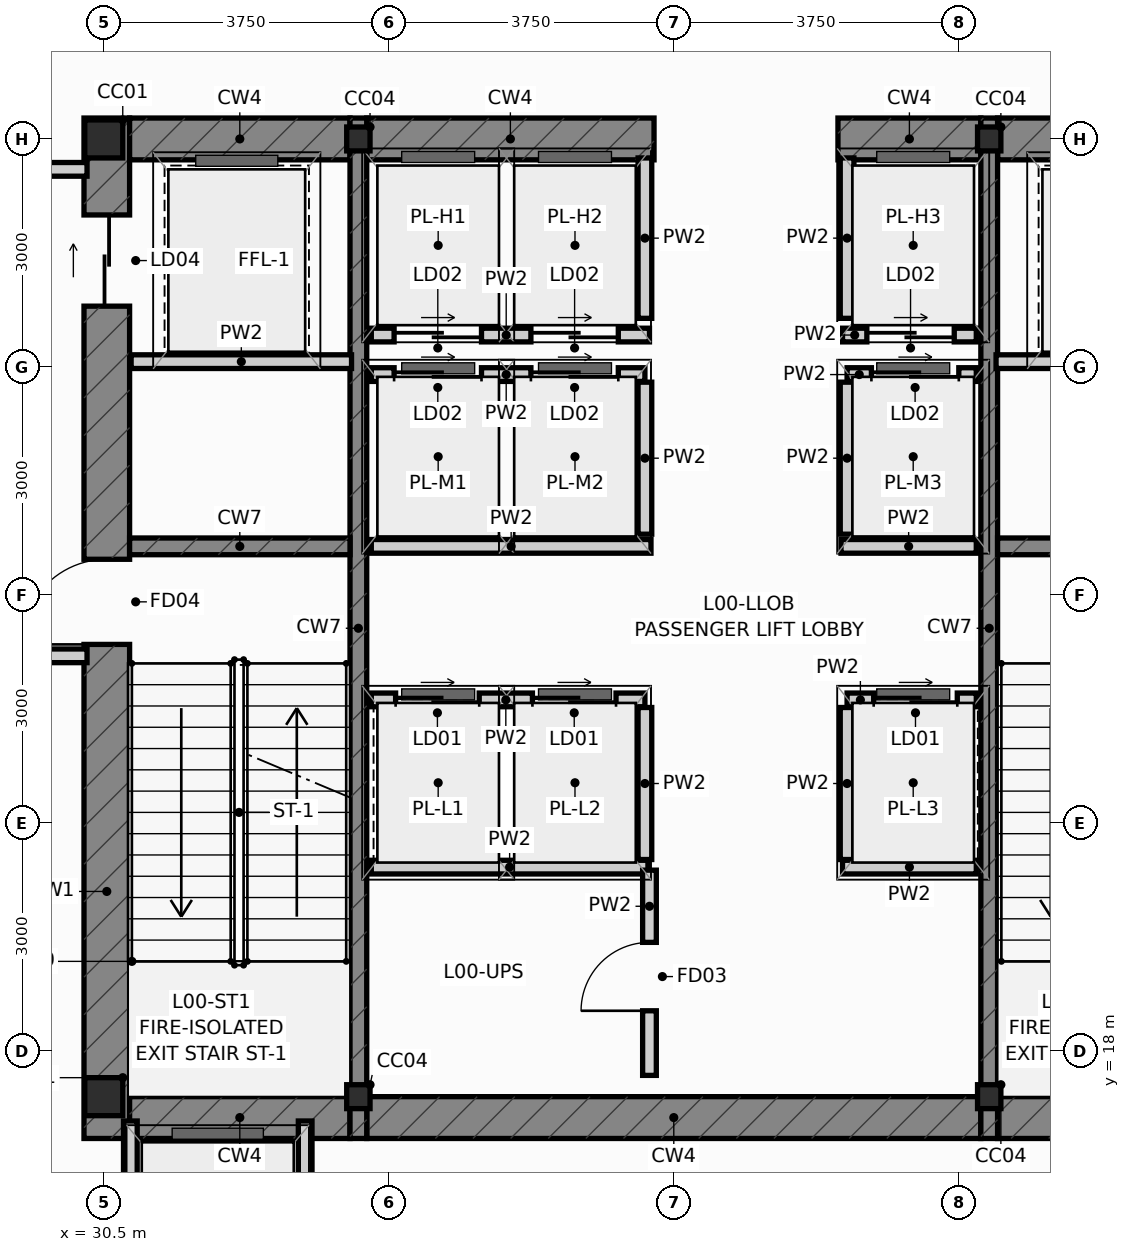
"""IFC4 building model, lengths in metres.
Left out: names, types, materials, properties, quantities, classifications, styles, units other than length and angle.
Written with IfcOpenShell. Run it as: python <this file> out.ifc"""

import sys

from ifc_helpers import new_model, si_unit, direction, frame, frame_2d, origin, origin_2d, place, context, subcontext, project, spatial, rectangle, i_section, extrude, source, transform, mapped, element, fill, save


model = new_model("IFC4")
c1 = context("Model", 3, precision=1e-05, world=origin(), true_north=direction((0.0, 1.0)))
c2 = subcontext(c1, "Body", "Model", "MODEL_VIEW")
j1 = project(units=[si_unit("LENGTHUNIT", "METRE"), si_unit("PLANEANGLEUNIT", "RADIAN")], contexts=[c1])
p1 = place(None, origin())
s1 = spatial("IfcSite", under=j1, at=p1, CompositionType="ELEMENT")
p2 = place(p1, origin())
s2 = spatial("IfcBuilding", under=s1, at=p2, CompositionType="ELEMENT")
p3 = place(p2, origin())
s3 = spatial("IfcBuildingStorey", under=s2, at=p3, CompositionType="ELEMENT", Elevation=0.0)
m1 = source(origin(), c2, "Body", "SweptSolid", [
    extrude(i_section(OverallWidth=0.5, OverallDepth=0.5, WebThickness=0.028, FlangeThickness=0.04, at=origin_2d()), origin(), (0.0, 0.0, 1.0), 5.4),
])
for number, where, z_axis, x_axis in (
    (1, (30.5, 17.4, 0.0), (0.0, 0.0, 1.0), (1.0, 0.0, 0.0)),
    (2, (30.5, 30.0, 0.0), (0.0, 0.0, 1.0), (1.0, 0.0, 0.0)),
):
    element("IfcColumn", number, at=place(p3, frame(where, z_axis=z_axis, x_axis=x_axis)), inside=s3, PredefinedType="COLUMN", context=c2, shape_type="MappedRepresentation", body=[
        mapped(m1, transform((0.0, 0.0, 0.0), scale=1.0)),
    ])
m2 = source(origin(), c2, "Body", "SweptSolid", [
    extrude(i_section(OverallWidth=0.307, OverallDepth=0.315, WebThickness=0.012, FlangeThickness=0.019, at=origin_2d()), origin(), (0.0, 0.0, 1.0), 5.4),
])
for number, where, z_axis, x_axis in (
    (3, (33.85, 17.4, 0.0), (0.0, 0.0, 1.0), (1.0, 0.0, 0.0)),
    (4, (42.15, 17.4, 0.0), (0.0, 0.0, 1.0), (1.0, 0.0, 0.0)),
    (5, (33.85, 30.0, 0.0), (0.0, 0.0, 1.0), (1.0, 0.0, 0.0)),
    (6, (42.15, 30.0, 0.0), (0.0, 0.0, 1.0), (1.0, 0.0, 0.0)),
):
    element("IfcColumn", number, at=place(p3, frame(where, z_axis=z_axis, x_axis=x_axis)), inside=s3, PredefinedType="COLUMN", context=c2, shape_type="MappedRepresentation", body=[
        mapped(m2, transform((0.0, 0.0, 0.0), scale=1.0)),
    ])
p4 = place(p3, frame((30.54, 16.85, 0.0), z_axis=(0.0, 0.0, 1.0), x_axis=(0.0, 1.0, 0.0)))
e7 = element("IfcWall", 7, at=p4, inside=s3, PredefinedType="SHEAR", context=c2, shape_type="SweptSolid", body=[
    extrude(rectangle(XDim=13.425, YDim=0.6, at=frame_2d((6.712, 0.0))), origin(), (0.0, 0.0, 1.0), 5.4),
])
p5 = place(p4, frame((6.5, 0.0, 0.0)))
e8 = element("IfcOpeningElement", 8, at=p5, cuts=e7, PredefinedType="OPENING", context=c2, shape_type="SweptSolid", body=[
    extrude(rectangle(XDim=1.12, YDim=2.15, at=frame_2d((0.56, 1.075))), frame((0.0, 0.312, 0.0), z_axis=(0.0, -1.0, 0.0), x_axis=(1.0, 0.0, 0.0)), (0.0, 0.0, 1.0), 0.624),
])
p6 = place(p4, frame((10.95, 0.0, 0.0)))
e9 = element("IfcOpeningElement", 9, at=p6, cuts=e7, PredefinedType="OPENING", context=c2, shape_type="SweptSolid", body=[
    extrude(rectangle(XDim=1.2, YDim=2.2, at=frame_2d((0.6, 1.1))), frame((0.0, 0.312, 0.0), z_axis=(0.0, -1.0, 0.0), x_axis=(1.0, 0.0, 0.0)), (0.0, 0.0, 1.0), 0.624),
])
p7 = place(p3, frame((30.84, 17.125, 0.0), z_axis=(0.0, 0.0, 1.0), x_axis=(1.0, 0.0, 0.0)))
e10 = element("IfcWall", 10, at=p7, inside=s3, PredefinedType="SHEAR", context=c2, shape_type="SweptSolid", body=[
    extrude(rectangle(XDim=2.9, YDim=0.55, at=frame_2d((1.45, 0.0))), origin(), (0.0, 0.0, 1.0), 5.4),
])
p8 = place(p3, frame((33.96, 17.125, 0.0), z_axis=(0.0, 0.0, 1.0), x_axis=(1.0, 0.0, 0.0)))
e11 = element("IfcWall", 11, at=p8, inside=s3, PredefinedType="SHEAR", context=c2, shape_type="SweptSolid", body=[
    extrude(rectangle(XDim=8.08, YDim=0.55, at=frame_2d((4.04, 0.0))), origin(), (0.0, 0.0, 1.0), 5.4),
])
for number, where, z_axis, x_axis in (
    (12, (42.26, 17.125, 0.0), (0.0, 0.0, 1.0), (1.0, 0.0, 0.0)),
    (13, (30.84, 30.0, 0.0), (0.0, 0.0, 1.0), (1.0, 0.0, 0.0)),
):
    element("IfcWall", number, at=place(p3, frame(where, z_axis=z_axis, x_axis=x_axis)), inside=s3, PredefinedType="SHEAR", context=c2, shape_type="SweptSolid", body=[
        extrude(rectangle(XDim=2.9, YDim=0.55, at=frame_2d((1.45, 0.0))), origin(), (0.0, 0.0, 1.0), 5.4),
    ])
p9 = place(p3, frame((33.96, 30.0, 0.0), z_axis=(0.0, 0.0, 1.0), x_axis=(1.0, 0.0, 0.0)))
e14 = element("IfcWall", 14, at=p9, inside=s3, PredefinedType="SHEAR", context=c2, shape_type="SweptSolid", body=[
    extrude(rectangle(XDim=3.78, YDim=0.55, at=frame_2d((1.89, 0.0))), origin(), (0.0, 0.0, 1.0), 5.4),
])
p10 = place(p3, frame((40.16, 30.0, 0.0), z_axis=(0.0, 0.0, 1.0), x_axis=(1.0, 0.0, 0.0)))
e15 = element("IfcWall", 15, at=p10, inside=s3, PredefinedType="SHEAR", context=c2, shape_type="SweptSolid", body=[
    extrude(rectangle(XDim=1.88, YDim=0.55, at=frame_2d((0.94, 0.0))), origin(), (0.0, 0.0, 1.0), 5.4),
])
p11 = place(p3, frame((42.26, 30.0, 0.0), z_axis=(0.0, 0.0, 1.0), x_axis=(1.0, 0.0, 0.0)))
e16 = element("IfcWall", 16, at=p11, inside=s3, PredefinedType="SHEAR", context=c2, shape_type="SweptSolid", body=[
    extrude(rectangle(XDim=2.9, YDim=0.55, at=frame_2d((1.45, 0.0))), origin(), (0.0, 0.0, 1.0), 5.4),
])
for number, where, z_axis, x_axis in (
    (17, (33.85, 16.85, 0.0), (0.0, 0.0, 1.0), (0.0, 1.0, 0.0)),
    (18, (42.15, 16.85, 0.0), (0.0, 0.0, 1.0), (0.0, 1.0, 0.0)),
):
    element("IfcWall", number, at=place(p3, frame(where, z_axis=z_axis, x_axis=x_axis)), inside=s3, PredefinedType="SHEAR", context=c2, shape_type="SweptSolid", body=[
        extrude(rectangle(XDim=13.425, YDim=0.22, at=frame_2d((6.712, 0.0))), origin(), (0.0, 0.0, 1.0), 5.4),
    ])
for number, where, z_axis, x_axis in (
    (19, (30.84, 24.64, 0.0), (0.0, 0.0, 1.0), (1.0, 0.0, 0.0)),
    (20, (42.26, 24.64, 0.0), (0.0, 0.0, 1.0), (1.0, 0.0, 0.0)),
):
    element("IfcWall", number, at=place(p3, frame(where, z_axis=z_axis, x_axis=x_axis)), inside=s3, PredefinedType="SHEAR", context=c2, shape_type="SweptSolid", body=[
        extrude(rectangle(XDim=2.9, YDim=0.22, at=frame_2d((1.45, 0.0))), origin(), (0.0, 0.0, 1.0), 5.4),
    ])
p12 = place(p3, frame((30.85, 14.42, 0.0), z_axis=(0.0, 0.0, 1.0), x_axis=(0.0, 1.0, 0.0)))
e21 = element("IfcWall", 21, at=p12, inside=s3, PredefinedType="PARTITIONING", context=c2, shape_type="SweptSolid", body=[
    extrude(rectangle(XDim=2.66, YDim=0.18, at=frame_2d((1.33, 0.0))), origin(), (0.0, 0.0, 1.0), 4.453),
])
p13 = place(p3, frame((33.15, 14.42, 0.0), z_axis=(0.0, 0.0, 1.0), x_axis=(0.0, 1.0, 0.0)))
e22 = element("IfcWall", 22, at=p13, inside=s3, PredefinedType="PARTITIONING", context=c2, shape_type="SweptSolid", body=[
    extrude(rectangle(XDim=2.66, YDim=0.18, at=frame_2d((1.33, 0.0))), origin(), (0.0, 0.0, 1.0), 5.08),
])
p14 = place(p3, frame((34.02, 22.62, 0.0), z_axis=(0.0, 0.0, 1.0), x_axis=(1.0, 0.0, 0.0)))
e23 = element("IfcWall", 23, at=p14, inside=s3, PredefinedType="PARTITIONING", context=c2, shape_type="SweptSolid", body=[
    extrude(rectangle(XDim=3.6, YDim=0.18, at=frame_2d((1.8, 0.0))), origin(), (0.0, 0.0, 1.0), 5.08),
])
p15 = place(p14, frame((0.32, 0.0, 0.0)))
e24 = element("IfcOpeningElement", 24, at=p15, cuts=e23, PredefinedType="OPENING", context=c2, shape_type="SweptSolid", body=[
    extrude(rectangle(XDim=1.1, YDim=2.2, at=frame_2d((0.55, 1.1))), frame((0.0, 0.102, 0.0), z_axis=(0.0, -1.0, 0.0), x_axis=(1.0, 0.0, 0.0)), (0.0, 0.0, 1.0), 0.204),
])
p16 = place(p14, frame((2.12, 0.0, 0.0)))
e25 = element("IfcOpeningElement", 25, at=p16, cuts=e23, PredefinedType="OPENING", context=c2, shape_type="SweptSolid", body=[
    extrude(rectangle(XDim=1.1, YDim=2.2, at=frame_2d((0.55, 1.1))), frame((0.0, 0.102, 0.0), z_axis=(0.0, -1.0, 0.0), x_axis=(1.0, 0.0, 0.0)), (0.0, 0.0, 1.0), 0.204),
])
p17 = place(p3, frame((40.28, 22.62, 0.0), z_axis=(0.0, 0.0, 1.0), x_axis=(1.0, 0.0, 0.0)))
e26 = element("IfcWall", 26, at=p17, inside=s3, PredefinedType="PARTITIONING", context=c2, shape_type="SweptSolid", body=[
    extrude(rectangle(XDim=1.7, YDim=0.18, at=frame_2d((0.85, 0.0))), origin(), (0.0, 0.0, 1.0), 5.08),
])
p18 = place(p17, frame((0.35, 0.0, 0.0)))
e27 = element("IfcOpeningElement", 27, at=p18, cuts=e26, PredefinedType="OPENING", context=c2, shape_type="SweptSolid", body=[
    extrude(rectangle(XDim=1.1, YDim=2.2, at=frame_2d((0.55, 1.1))), frame((0.0, 0.102, 0.0), z_axis=(0.0, -1.0, 0.0), x_axis=(1.0, 0.0, 0.0)), (0.0, 0.0, 1.0), 0.204),
])
for number, where, z_axis, x_axis in (
    (28, (37.62, 20.52, 0.0), (0.0, 0.0, 1.0), (0.0, 1.0, 0.0)),
    (29, (40.28, 20.52, 0.0), (0.0, 0.0, 1.0), (0.0, 1.0, 0.0)),
):
    element("IfcWall", number, at=place(p3, frame(where, z_axis=z_axis, x_axis=x_axis)), inside=s3, PredefinedType="PARTITIONING", context=c2, shape_type="SweptSolid", body=[
        extrude(rectangle(XDim=2.0, YDim=0.18, at=frame_2d((1.0, 0.0))), origin(), (0.0, 0.0, 1.0), 5.08),
    ])
p19 = place(p3, frame((34.02, 26.9, 0.0), z_axis=(0.0, 0.0, 1.0), x_axis=(1.0, 0.0, 0.0)))
e30 = element("IfcWall", 30, at=p19, inside=s3, PredefinedType="PARTITIONING", context=c2, shape_type="SweptSolid", body=[
    extrude(rectangle(XDim=3.6, YDim=0.18, at=frame_2d((1.8, 0.0))), origin(), (0.0, 0.0, 1.0), 5.08),
])
p20 = place(p19, frame((0.3, 0.0, 0.0)))
e31 = element("IfcOpeningElement", 31, at=p20, cuts=e30, PredefinedType="OPENING", context=c2, shape_type="SweptSolid", body=[
    extrude(rectangle(XDim=1.15, YDim=2.2, at=frame_2d((0.575, 1.1))), frame((0.0, 0.102, 0.0), z_axis=(0.0, -1.0, 0.0), x_axis=(1.0, 0.0, 0.0)), (0.0, 0.0, 1.0), 0.204),
])
p21 = place(p19, frame((2.1, 0.0, 0.0)))
e32 = element("IfcOpeningElement", 32, at=p21, cuts=e30, PredefinedType="OPENING", context=c2, shape_type="SweptSolid", body=[
    extrude(rectangle(XDim=1.15, YDim=2.2, at=frame_2d((0.575, 1.1))), frame((0.0, 0.102, 0.0), z_axis=(0.0, -1.0, 0.0), x_axis=(1.0, 0.0, 0.0)), (0.0, 0.0, 1.0), 0.204),
])
p22 = place(p3, frame((40.28, 26.9, 0.0), z_axis=(0.0, 0.0, 1.0), x_axis=(1.0, 0.0, 0.0)))
e33 = element("IfcWall", 33, at=p22, inside=s3, PredefinedType="PARTITIONING", context=c2, shape_type="SweptSolid", body=[
    extrude(rectangle(XDim=1.7, YDim=0.18, at=frame_2d((0.85, 0.0))), origin(), (0.0, 0.0, 1.0), 5.08),
])
p23 = place(p22, frame((0.32, 0.0, 0.0)))
e34 = element("IfcOpeningElement", 34, at=p23, cuts=e33, PredefinedType="OPENING", context=c2, shape_type="SweptSolid", body=[
    extrude(rectangle(XDim=1.15, YDim=2.2, at=frame_2d((0.575, 1.1))), frame((0.0, 0.102, 0.0), z_axis=(0.0, -1.0, 0.0), x_axis=(1.0, 0.0, 0.0)), (0.0, 0.0, 1.0), 0.204),
])
for number, where, z_axis, x_axis in (
    (35, (37.62, 24.8, 0.0), (0.0, 0.0, 1.0), (0.0, 1.0, 0.0)),
    (36, (40.28, 24.8, 0.0), (0.0, 0.0, 1.0), (0.0, 1.0, 0.0)),
):
    element("IfcWall", number, at=place(p3, frame(where, z_axis=z_axis, x_axis=x_axis)), inside=s3, PredefinedType="PARTITIONING", context=c2, shape_type="SweptSolid", body=[
        extrude(rectangle(XDim=2.0, YDim=0.18, at=frame_2d((1.0, 0.0))), origin(), (0.0, 0.0, 1.0), 5.08),
    ])
p24 = place(p3, frame((34.02, 24.64, 0.0), z_axis=(0.0, 0.0, 1.0), x_axis=(1.0, 0.0, 0.0)))
e37 = element("IfcWall", 37, at=p24, inside=s3, PredefinedType="PARTITIONING", context=c2, shape_type="SweptSolid", body=[
    extrude(rectangle(XDim=3.68, YDim=0.18, at=frame_2d((1.84, 0.0))), origin(), (0.0, 0.0, 1.0), 5.08),
])
p25 = place(p3, frame((40.2, 24.64, 0.0), z_axis=(0.0, 0.0, 1.0), x_axis=(1.0, 0.0, 0.0)))
e38 = element("IfcWall", 38, at=p25, inside=s3, PredefinedType="PARTITIONING", context=c2, shape_type="SweptSolid", body=[
    extrude(rectangle(XDim=1.78, YDim=0.18, at=frame_2d((0.89, 0.0))), origin(), (0.0, 0.0, 1.0), 5.08),
])
p26 = place(p3, frame((34.02, 27.42, 0.0), z_axis=(0.0, 0.0, 1.0), x_axis=(1.0, 0.0, 0.0)))
e39 = element("IfcWall", 39, at=p26, inside=s3, PredefinedType="PARTITIONING", context=c2, shape_type="SweptSolid", body=[
    extrude(rectangle(XDim=3.66, YDim=0.18, at=frame_2d((1.83, 0.0))), origin(), (0.0, 0.0, 1.0), 5.08),
])
p27 = place(p26, frame((0.3, 0.0, 0.0)))
e40 = element("IfcOpeningElement", 40, at=p27, cuts=e39, PredefinedType="OPENING", context=c2, shape_type="SweptSolid", body=[
    extrude(rectangle(XDim=1.15, YDim=2.2, at=frame_2d((0.575, 1.1))), frame((0.0, 0.102, 0.0), z_axis=(0.0, -1.0, 0.0), x_axis=(1.0, 0.0, 0.0)), (0.0, 0.0, 1.0), 0.204),
])
p28 = place(p26, frame((2.1, 0.0, 0.0)))
e41 = element("IfcOpeningElement", 41, at=p28, cuts=e39, PredefinedType="OPENING", context=c2, shape_type="SweptSolid", body=[
    extrude(rectangle(XDim=1.15, YDim=2.2, at=frame_2d((0.575, 1.1))), frame((0.0, 0.102, 0.0), z_axis=(0.0, -1.0, 0.0), x_axis=(1.0, 0.0, 0.0)), (0.0, 0.0, 1.0), 0.204),
])
p29 = place(p3, frame((40.22, 27.42, 0.0), z_axis=(0.0, 0.0, 1.0), x_axis=(1.0, 0.0, 0.0)))
e42 = element("IfcWall", 42, at=p29, inside=s3, PredefinedType="PARTITIONING", context=c2, shape_type="SweptSolid", body=[
    extrude(rectangle(XDim=1.76, YDim=0.18, at=frame_2d((0.88, 0.0))), origin(), (0.0, 0.0, 1.0), 5.08),
])
p30 = place(p29, frame((0.32, 0.0, 0.0)))
e43 = element("IfcOpeningElement", 43, at=p30, cuts=e42, PredefinedType="OPENING", context=c2, shape_type="SweptSolid", body=[
    extrude(rectangle(XDim=1.15, YDim=2.2, at=frame_2d((0.575, 1.1))), frame((0.0, 0.102, 0.0), z_axis=(0.0, -1.0, 0.0), x_axis=(1.0, 0.0, 0.0)), (0.0, 0.0, 1.0), 0.204),
])
for number, where, z_axis, x_axis in (
    (44, (37.62, 27.64, 0.0), (0.0, 0.0, 1.0), (0.0, 1.0, 0.0)),
    (45, (40.28, 27.64, 0.0), (0.0, 0.0, 1.0), (0.0, 1.0, 0.0)),
):
    element("IfcWall", number, at=place(p3, frame(where, z_axis=z_axis, x_axis=x_axis)), inside=s3, PredefinedType="PARTITIONING", context=c2, shape_type="SweptSolid", body=[
        extrude(rectangle(XDim=2.11, YDim=0.18, at=frame_2d((1.055, 0.0))), origin(), (0.0, 0.0, 1.0), 5.08),
    ])
p31 = place(p3, frame((27.52, 23.2, 0.0), z_axis=(0.0, 0.0, 1.0), x_axis=(1.0, 0.0, 0.0)))
e46 = element("IfcWall", 46, at=p31, inside=s3, PredefinedType="PARTITIONING", context=c2, shape_type="SweptSolid", body=[
    extrude(rectangle(XDim=2.76, YDim=0.18, at=frame_2d((1.38, 0.0))), origin(), (0.0, 0.0, 1.0), 5.08),
])
p32 = place(p3, frame((27.52, 29.6, 0.0), z_axis=(0.0, 0.0, 1.0), x_axis=(1.0, 0.0, 0.0)))
e47 = element("IfcWall", 47, at=p32, inside=s3, PredefinedType="PARTITIONING", context=c2, shape_type="SweptSolid", body=[
    extrude(rectangle(XDim=2.76, YDim=0.18, at=frame_2d((1.38, 0.0))), origin(), (0.0, 0.0, 1.0), 4.453),
])
for number, where, z_axis, x_axis in (
    (48, (30.86, 27.07, 0.0), (0.0, 0.0, 1.0), (1.0, 0.0, 0.0)),
    (49, (42.24, 27.07, 0.0), (0.0, 0.0, 1.0), (1.0, 0.0, 0.0)),
):
    element("IfcWall", number, at=place(p3, frame(where, z_axis=z_axis, x_axis=x_axis)), inside=s3, PredefinedType="PARTITIONING", context=c2, shape_type="SweptSolid", body=[
        extrude(rectangle(XDim=2.9, YDim=0.18, at=frame_2d((1.45, 0.0))), origin(), (0.0, 0.0, 1.0), 5.08),
    ])
p33 = place(p3, frame((34.02, 20.42, 0.0), z_axis=(0.0, 0.0, 1.0), x_axis=(1.0, 0.0, 0.0)))
e50 = element("IfcWall", 50, at=p33, inside=s3, PredefinedType="PARTITIONING", context=c2, shape_type="SweptSolid", body=[
    extrude(rectangle(XDim=3.64, YDim=0.18, at=frame_2d((1.82, 0.0))), origin(), (0.0, 0.0, 1.0), 5.08),
])
p34 = place(p3, frame((40.22, 20.42, 0.0), z_axis=(0.0, 0.0, 1.0), x_axis=(1.0, 0.0, 0.0)))
e51 = element("IfcWall", 51, at=p34, inside=s3, PredefinedType="PARTITIONING", context=c2, shape_type="SweptSolid", body=[
    extrude(rectangle(XDim=1.76, YDim=0.18, at=frame_2d((0.88, 0.0))), origin(), (0.0, 0.0, 1.0), 5.08),
])
p35 = place(p3, frame((37.68, 17.68, 0.0), z_axis=(0.0, 0.0, 1.0), x_axis=(0.0, 1.0, 0.0)))
e52 = element("IfcWall", 52, at=p35, inside=s3, PredefinedType="PARTITIONING", context=c2, shape_type="SweptSolid", body=[
    extrude(rectangle(XDim=2.7, YDim=0.18, at=frame_2d((1.35, 0.0))), origin(), (0.0, 0.0, 1.0), 5.08),
])
p36 = place(p35, frame((0.85, 0.0, 0.0)))
e53 = element("IfcOpeningElement", 53, at=p36, cuts=e52, PredefinedType="OPENING", context=c2, shape_type="SweptSolid", body=[
    extrude(rectangle(XDim=0.9, YDim=2.1, at=frame_2d((0.45, 1.05))), frame((0.0, 0.102, 0.0), z_axis=(0.0, -1.0, 0.0), x_axis=(1.0, 0.0, 0.0)), (0.0, 0.0, 1.0), 0.204),
])
p37 = place(p5, origin())
e54 = element("IfcDoor", 54, at=p37, inside=s3, OperationType="SINGLE_SWING_LEFT", PredefinedType="DOOR", context=c2, shape_type="SweptSolid", body=[
    extrude(rectangle(XDim=1.12, YDim=2.15, at=frame_2d((0.56, 1.075))), frame((0.0, 0.025, 0.0), z_axis=(0.0, -1.0, 0.0), x_axis=(1.0, 0.0, 0.0)), (0.0, 0.0, 1.0), 0.05),
])
fill(e8, e54)
p38 = place(p6, origin())
e55 = element("IfcDoor", 55, at=p38, inside=s3, OperationType="SLIDING_TO_LEFT", PredefinedType="DOOR", context=c2, shape_type="SweptSolid", body=[
    extrude(rectangle(XDim=1.2, YDim=2.2, at=frame_2d((0.6, 1.1))), frame((0.0, 0.025, 0.0), z_axis=(0.0, -1.0, 0.0), x_axis=(1.0, 0.0, 0.0)), (0.0, 0.0, 1.0), 0.05),
])
fill(e9, e55)
p39 = place(p15, origin())
e56 = element("IfcDoor", 56, at=p39, inside=s3, OperationType="SLIDING_TO_LEFT", PredefinedType="DOOR", context=c2, shape_type="SweptSolid", body=[
    extrude(rectangle(XDim=1.1, YDim=2.2, at=frame_2d((0.55, 1.1))), frame((0.0, 0.025, 0.0), z_axis=(0.0, -1.0, 0.0), x_axis=(1.0, 0.0, 0.0)), (0.0, 0.0, 1.0), 0.05),
])
fill(e24, e56)
p40 = place(p16, origin())
e57 = element("IfcDoor", 57, at=p40, inside=s3, OperationType="SLIDING_TO_RIGHT", PredefinedType="DOOR", context=c2, shape_type="SweptSolid", body=[
    extrude(rectangle(XDim=1.1, YDim=2.2, at=frame_2d((0.55, 1.1))), frame((0.0, 0.025, 0.0), z_axis=(0.0, -1.0, 0.0), x_axis=(1.0, 0.0, 0.0)), (0.0, 0.0, 1.0), 0.05),
])
fill(e25, e57)
p41 = place(p18, origin())
e58 = element("IfcDoor", 58, at=p41, inside=s3, OperationType="SLIDING_TO_LEFT", PredefinedType="DOOR", context=c2, shape_type="SweptSolid", body=[
    extrude(rectangle(XDim=1.1, YDim=2.2, at=frame_2d((0.55, 1.1))), frame((0.0, 0.025, 0.0), z_axis=(0.0, -1.0, 0.0), x_axis=(1.0, 0.0, 0.0)), (0.0, 0.0, 1.0), 0.05),
])
fill(e27, e58)
p42 = place(p20, origin())
e59 = element("IfcDoor", 59, at=p42, inside=s3, OperationType="SLIDING_TO_LEFT", PredefinedType="DOOR", context=c2, shape_type="SweptSolid", body=[
    extrude(rectangle(XDim=1.15, YDim=2.2, at=frame_2d((0.575, 1.1))), frame((0.0, 0.025, 0.0), z_axis=(0.0, -1.0, 0.0), x_axis=(1.0, 0.0, 0.0)), (0.0, 0.0, 1.0), 0.05),
])
fill(e31, e59)
p43 = place(p21, origin())
e60 = element("IfcDoor", 60, at=p43, inside=s3, OperationType="SLIDING_TO_RIGHT", PredefinedType="DOOR", context=c2, shape_type="SweptSolid", body=[
    extrude(rectangle(XDim=1.15, YDim=2.2, at=frame_2d((0.575, 1.1))), frame((0.0, 0.025, 0.0), z_axis=(0.0, -1.0, 0.0), x_axis=(1.0, 0.0, 0.0)), (0.0, 0.0, 1.0), 0.05),
])
fill(e32, e60)
p44 = place(p23, origin())
e61 = element("IfcDoor", 61, at=p44, inside=s3, OperationType="SLIDING_TO_LEFT", PredefinedType="DOOR", context=c2, shape_type="SweptSolid", body=[
    extrude(rectangle(XDim=1.15, YDim=2.2, at=frame_2d((0.575, 1.1))), frame((0.0, 0.025, 0.0), z_axis=(0.0, -1.0, 0.0), x_axis=(1.0, 0.0, 0.0)), (0.0, 0.0, 1.0), 0.05),
])
fill(e34, e61)
p45 = place(p27, origin())
e62 = element("IfcDoor", 62, at=p45, inside=s3, OperationType="SLIDING_TO_RIGHT", PredefinedType="DOOR", context=c2, shape_type="SweptSolid", body=[
    extrude(rectangle(XDim=1.15, YDim=2.2, at=frame_2d((0.575, 1.1))), frame((0.0, 0.025, 0.0), z_axis=(0.0, -1.0, 0.0), x_axis=(1.0, 0.0, 0.0)), (0.0, 0.0, 1.0), 0.05),
])
fill(e40, e62)
p46 = place(p28, origin())
e63 = element("IfcDoor", 63, at=p46, inside=s3, OperationType="SLIDING_TO_LEFT", PredefinedType="DOOR", context=c2, shape_type="SweptSolid", body=[
    extrude(rectangle(XDim=1.15, YDim=2.2, at=frame_2d((0.575, 1.1))), frame((0.0, 0.025, 0.0), z_axis=(0.0, -1.0, 0.0), x_axis=(1.0, 0.0, 0.0)), (0.0, 0.0, 1.0), 0.05),
])
fill(e41, e63)
p47 = place(p30, origin())
e64 = element("IfcDoor", 64, at=p47, inside=s3, OperationType="SLIDING_TO_RIGHT", PredefinedType="DOOR", context=c2, shape_type="SweptSolid", body=[
    extrude(rectangle(XDim=1.15, YDim=2.2, at=frame_2d((0.575, 1.1))), frame((0.0, 0.025, 0.0), z_axis=(0.0, -1.0, 0.0), x_axis=(1.0, 0.0, 0.0)), (0.0, 0.0, 1.0), 0.05),
])
fill(e43, e64)
p48 = place(p36, origin())
e65 = element("IfcDoor", 65, at=p48, inside=s3, OperationType="SINGLE_SWING_LEFT", PredefinedType="DOOR", context=c2, shape_type="SweptSolid", body=[
    extrude(rectangle(XDim=0.9, YDim=2.1, at=frame_2d((0.45, 1.05))), frame((0.0, 0.025, 0.0), z_axis=(0.0, -1.0, 0.0), x_axis=(1.0, 0.0, 0.0)), (0.0, 0.0, 1.0), 0.05),
])
fill(e53, e65)
save(model, sys.argv[1])
